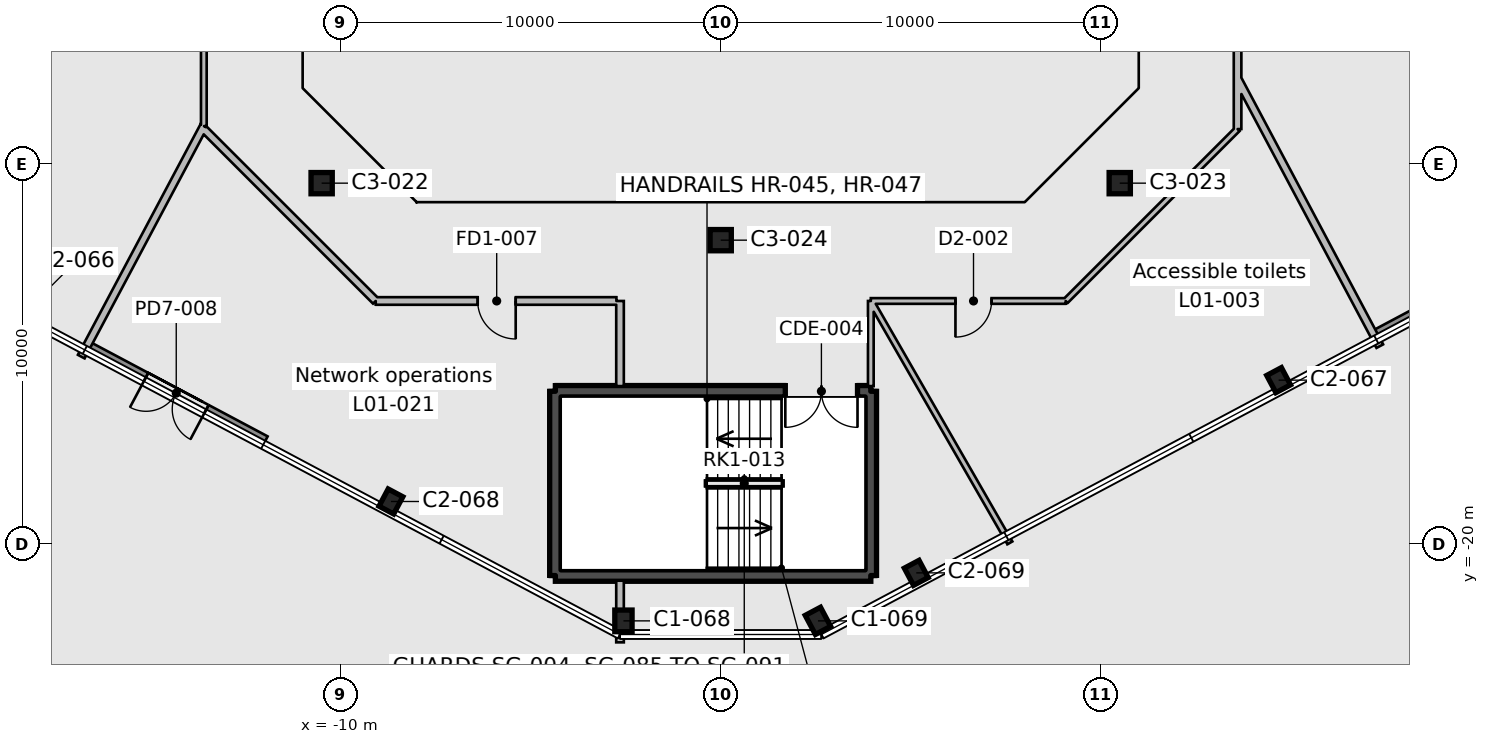
"""IFC4 building model, lengths in metres.
Left out: names, types, materials, properties, quantities, classifications, styles, units other than length and angle.
Written with IfcOpenShell. Run it as: python <this file> out.ifc"""

import sys

from ifc_helpers import new_model, si_unit, direction, frame, frame_2d, origin, origin_2d, place, context, subcontext, project, spatial, rectangle, hollow_rectangle, i_section, extrude, element, fill, save


model = new_model("IFC4")
c1 = context("Model", 3, precision=1e-05, world=origin(), true_north=direction((0.0, 1.0)))
c2 = subcontext(c1, "Body", "Model", "MODEL_VIEW")
j1 = project(units=[si_unit("LENGTHUNIT", "METRE"), si_unit("PLANEANGLEUNIT", "RADIAN")], contexts=[c1])
p1 = place(None, origin())
s1 = spatial("IfcSite", under=j1, at=p1, CompositionType="ELEMENT")
p2 = place(p1, origin())
s2 = spatial("IfcBuilding", under=s1, at=p2, CompositionType="ELEMENT")
p3 = place(p2, frame((0.0, 0.0, 7.0)))
s3 = spatial("IfcBuildingStorey", under=s2, at=p3, CompositionType="ELEMENT", Elevation=7.0)
for number, where, z_axis, x_axis in (
    (1, (-2.559, -22.017, 0.0), (0.0, 0.0, 1.0), (1.0, 0.0, 0.0)),
    (2, (2.559, -22.017, 0.0), (0.0, 0.0, 1.0), (0.883, 0.469, 0.0)),
):
    element("IfcColumn", number, at=place(p3, frame(where, z_axis=z_axis, x_axis=x_axis)), inside=s3, PredefinedType="COLUMN", context=c2, shape_type="SweptSolid", body=[
        extrude(i_section(OverallWidth=0.455, OverallDepth=0.569, WebThickness=0.078, FlangeThickness=0.125, FilletRadius=0.015, at=origin_2d()), origin(), (0.0, 0.0, 1.0), 5.2),
    ])
for number, where, z_axis, x_axis in (
    (3, (5.146, -20.754, 0.0), (0.0, 0.0, 1.0), (0.883, 0.469, 0.0)),
    (4, (-8.677, -18.876, 0.0), (0.0, 0.0, 1.0), (0.883, -0.469, 0.0)),
    (5, (14.681, -15.683, 0.0), (0.0, 0.0, 1.0), (0.883, 0.469, 0.0)),
):
    element("IfcColumn", number, at=place(p3, frame(where, z_axis=z_axis, x_axis=x_axis)), inside=s3, PredefinedType="COLUMN", context=c2, shape_type="SweptSolid", body=[
        extrude(i_section(OverallWidth=0.437, OverallDepth=0.513, WebThickness=0.061, FlangeThickness=0.097, FilletRadius=0.015, at=origin_2d()), origin(), (0.0, 0.0, 1.0), 5.2),
    ])
for number, where, z_axis, x_axis in (
    (6, (0.0, -12.0, 0.0), (0.0, 0.0, 1.0), (1.0, 0.0, 0.0)),
    (7, (-10.5, -10.5, 0.0), (0.0, 0.0, 1.0), (1.0, 0.0, 0.0)),
    (8, (10.5, -10.5, 0.0), (0.0, 0.0, 1.0), (1.0, 0.0, 0.0)),
):
    element("IfcColumn", number, at=place(p3, frame(where, z_axis=z_axis, x_axis=x_axis)), inside=s3, PredefinedType="COLUMN", context=c2, shape_type="SweptSolid", body=[
        extrude(hollow_rectangle(XDim=0.559, YDim=0.559, WallThickness=0.024, InnerFilletRadius=0.012, OuterFilletRadius=0.035, at=origin_2d()), origin(), (0.0, 0.0, 1.0), 5.2),
    ])
p4 = place(p3, frame((3.95, -15.975, 0.0), z_axis=(0.0, 0.0, 1.0), x_axis=(0.0, -1.0, 0.0)))
e9 = element("IfcWall", 9, at=p4, inside=s3, PredefinedType="SHEAR", context=c2, shape_type="SweptSolid", body=[
    extrude(rectangle(XDim=4.85, YDim=0.3, at=frame_2d((2.425, 0.0))), origin(), (0.0, 0.0, 1.0), 5.2),
])
p5 = place(p3, frame((3.95, -20.825, 0.0), z_axis=(0.0, 0.0, 1.0), x_axis=(-1.0, 0.0, 0.0)))
e10 = element("IfcWall", 10, at=p5, inside=s3, PredefinedType="SHEAR", context=c2, shape_type="SweptSolid", body=[
    extrude(rectangle(XDim=8.3, YDim=0.3, at=frame_2d((4.15, 0.0))), origin(), (0.0, 0.0, 1.0), 5.2),
])
p6 = place(p3, frame((-4.35, -20.825, 0.0), z_axis=(0.0, 0.0, 1.0), x_axis=(0.0, 1.0, 0.0)))
e11 = element("IfcWall", 11, at=p6, inside=s3, PredefinedType="SHEAR", context=c2, shape_type="SweptSolid", body=[
    extrude(rectangle(XDim=4.85, YDim=0.3, at=frame_2d((2.425, 0.0))), origin(), (0.0, 0.0, 1.0), 5.2),
])
p7 = place(p3, frame((-4.35, -15.975, 0.0), z_axis=(0.0, 0.0, 1.0), x_axis=(1.0, 0.0, 0.0)))
e12 = element("IfcWall", 12, at=p7, inside=s3, PredefinedType="SHEAR", context=c2, shape_type="SweptSolid", body=[
    extrude(rectangle(XDim=8.3, YDim=0.3, at=frame_2d((4.15, 0.0))), origin(), (0.0, 0.0, 1.0), 5.2),
])
p8 = place(p7, frame((6.05, 0.0, 0.0)))
e13 = element("IfcOpeningElement", 13, at=p8, cuts=e12, PredefinedType="OPENING", context=c2, shape_type="SweptSolid", body=[
    extrude(rectangle(XDim=1.9, YDim=2.1, at=frame_2d((0.95, 1.05))), frame((0.0, 0.16, 0.0), z_axis=(0.0, -1.0, 0.0), x_axis=(1.0, 0.0, 0.0)), (0.0, 0.0, 1.0), 0.32),
])
p9 = place(p3, frame((17.19, -14.502, 0.0), z_axis=(0.0, 0.0, 1.0), x_axis=(0.88294935199, 0.469468254326, 0.0)))
e14 = element("IfcWall", 14, at=p9, inside=s3, PredefinedType="STANDARD", context=c2, shape_type="SweptSolid", body=[
    extrude(rectangle(XDim=5.512, YDim=0.25, at=frame_2d((2.756, 0.0))), origin(), (0.0, 0.0, 1.0), 3.612),
])
p10 = place(p9, frame((1.856, 0.0, 0.0)))
e15 = element("IfcOpeningElement", 15, at=p10, cuts=e14, PredefinedType="OPENING", context=c2, shape_type="SweptSolid", body=[
    extrude(rectangle(XDim=1.8, YDim=2.4, at=frame_2d((0.9, 1.2))), frame((0.0, 0.135, 0.0), z_axis=(0.0, -1.0, 0.0), x_axis=(1.0, 0.0, 0.0)), (0.0, 0.0, 1.0), 0.27),
])
p11 = place(p3, frame((-16.673, -14.777, 0.0), z_axis=(0.0, 0.0, 1.0), x_axis=(0.882942052833, -0.46948198191, 0.0)))
e16 = element("IfcWall", 16, at=p11, inside=s3, PredefinedType="STANDARD", context=c2, shape_type="SweptSolid", body=[
    extrude(rectangle(XDim=5.317, YDim=0.25, at=frame_2d((2.658, 0.0))), origin(), (0.0, 0.0, 1.0), 3.612),
])
p12 = place(p11, frame((1.758, 0.0, 0.0)))
e17 = element("IfcOpeningElement", 17, at=p12, cuts=e16, PredefinedType="OPENING", context=c2, shape_type="SweptSolid", body=[
    extrude(rectangle(XDim=1.8, YDim=2.4, at=frame_2d((0.9, 1.2))), frame((0.0, 0.135, 0.0), z_axis=(0.0, -1.0, 0.0), x_axis=(1.0, 0.0, 0.0)), (0.0, 0.0, 1.0), 0.27),
])
p13 = place(p3, frame((-13.6, -8.998, 0.0), z_axis=(0.0, 0.0, 1.0), x_axis=(0.0, 1.0, 0.0)))
e18 = element("IfcWall", 18, at=p13, inside=s3, PredefinedType="PARTITIONING", context=c2, shape_type="SweptSolid", body=[
    extrude(rectangle(XDim=2.129, YDim=0.15, at=frame_2d((1.064, 0.0))), origin(), (0.0, 0.0, 1.0), 4.75),
])
p14 = place(p3, frame((-13.6, -8.998, 0.0), z_axis=(0.0, 0.0, 1.0), x_axis=(-0.469531053644, -0.882915958438, 0.0)))
e19 = element("IfcWall", 19, at=p14, inside=s3, PredefinedType="PARTITIONING", context=c2, shape_type="SweptSolid", body=[
    extrude(rectangle(XDim=6.87, YDim=0.2, at=frame_2d((3.435, 0.0))), origin(), (0.0, 0.0, 1.0), 4.75),
])
p15 = place(p3, frame((-2.744, -13.6, 0.0), z_axis=(0.0, 0.0, 1.0), x_axis=(-1.0, 0.0, 0.0)))
e20 = element("IfcWall", 20, at=p15, inside=s3, PredefinedType="PARTITIONING", context=c2, shape_type="SweptSolid", body=[
    extrude(rectangle(XDim=6.333, YDim=0.2, at=frame_2d((3.167, 0.0))), origin(), (0.0, 0.0, 1.0), 4.75),
])
p16 = place(p15, frame((2.65, 0.0, 0.0)))
e21 = element("IfcOpeningElement", 21, at=p16, cuts=e20, PredefinedType="OPENING", context=c2, shape_type="SweptSolid", body=[
    extrude(rectangle(XDim=1.0, YDim=2.1, at=frame_2d((0.5, 1.05))), frame((0.0, 0.11, 0.0), z_axis=(0.0, -1.0, 0.0), x_axis=(1.0, 0.0, 0.0)), (0.0, 0.0, 1.0), 0.22),
])
p17 = place(p3, frame((-9.077, -13.6, 0.0), z_axis=(0.0, 0.0, 1.0), x_axis=(-0.707106781187, 0.707106781187, 0.0)))
e22 = element("IfcWall", 22, at=p17, inside=s3, PredefinedType="PARTITIONING", context=c2, shape_type="SweptSolid", body=[
    extrude(rectangle(XDim=6.397, YDim=0.2, at=frame_2d((3.198, 0.0))), origin(), (0.0, 0.0, 1.0), 4.75),
])
p18 = place(p3, frame((-2.649, -15.84, 0.0), z_axis=(0.0, 0.0, 1.0), x_axis=(0.0, 1.0, 0.0)))
e23 = element("IfcWall", 23, at=p18, inside=s3, PredefinedType="PARTITIONING", context=c2, shape_type="SweptSolid", body=[
    extrude(rectangle(XDim=2.24, YDim=0.2, at=frame_2d((1.12, 0.0))), origin(), (0.0, 0.0, 1.0), 4.75),
])
p19 = place(p3, frame((-2.649, -20.96, 0.0), z_axis=(0.0, 0.0, 1.0), x_axis=(0.0, -1.0, 0.0)))
e24 = element("IfcWall", 24, at=p19, inside=s3, PredefinedType="PARTITIONING", context=c2, shape_type="SweptSolid", body=[
    extrude(rectangle(XDim=1.622, YDim=0.2, at=frame_2d((0.811, 0.0))), origin(), (0.0, 0.0, 1.0), 4.75),
])
p20 = place(p3, frame((3.95, -13.6, 0.0), z_axis=(0.0, 0.0, 1.0), x_axis=(0.0, -1.0, 0.0)))
e25 = element("IfcWall", 25, at=p20, inside=s3, PredefinedType="PARTITIONING", context=c2, shape_type="SweptSolid", body=[
    extrude(rectangle(XDim=2.24, YDim=0.15, at=frame_2d((1.12, 0.0))), origin(), (0.0, 0.0, 1.0), 4.75),
])
p21 = place(p3, frame((13.6, -7.756, 0.0), z_axis=(0.0, 0.0, 1.0), x_axis=(0.0, -1.0, 0.0)))
e26 = element("IfcWall", 26, at=p21, inside=s3, PredefinedType="PARTITIONING", context=c2, shape_type="SweptSolid", body=[
    extrude(rectangle(XDim=1.321, YDim=0.2, at=frame_2d((0.66, 0.0))), origin(), (0.0, 0.0, 1.0), 4.75),
])
p22 = place(p3, frame((13.6, -9.077, 0.0), z_axis=(0.0, 0.0, 1.0), x_axis=(-0.707106781187, -0.707106781187, 0.0)))
e27 = element("IfcWall", 27, at=p22, inside=s3, PredefinedType="PARTITIONING", context=c2, shape_type="SweptSolid", body=[
    extrude(rectangle(XDim=6.397, YDim=0.15, at=frame_2d((3.198, 0.0))), origin(), (0.0, 0.0, 1.0), 4.75),
])
p23 = place(p3, frame((9.077, -13.6, 0.0), z_axis=(0.0, 0.0, 1.0), x_axis=(-1.0, 0.0, 0.0)))
e28 = element("IfcWall", 28, at=p23, inside=s3, PredefinedType="PARTITIONING", context=c2, shape_type="SweptSolid", body=[
    extrude(rectangle(XDim=5.127, YDim=0.15, at=frame_2d((2.563, 0.0))), origin(), (0.0, 0.0, 1.0), 4.75),
])
p24 = place(p23, frame((1.95, 0.0, 0.0)))
e29 = element("IfcOpeningElement", 29, at=p24, cuts=e28, PredefinedType="OPENING", context=c2, shape_type="SweptSolid", body=[
    extrude(rectangle(XDim=0.95, YDim=2.1, at=frame_2d((0.475, 1.05))), frame((0.0, 0.085, 0.0), z_axis=(0.0, -1.0, 0.0), x_axis=(1.0, 0.0, 0.0)), (0.0, 0.0, 1.0), 0.17),
])
p25 = place(p3, frame((7.609, -19.965, 0.0), z_axis=(0.0, 0.0, 1.0), x_axis=(-0.498375530061, 0.866961262708, 0.0)))
e30 = element("IfcWall", 30, at=p25, inside=s3, PredefinedType="PARTITIONING", context=c2, shape_type="SweptSolid", body=[
    extrude(rectangle(XDim=7.342, YDim=0.15, at=frame_2d((3.671, 0.0))), origin(), (0.0, 0.0, 1.0), 4.75),
])
p26 = place(p3, frame((13.6, -7.75, 0.0), z_axis=(0.0, 0.0, 1.0), x_axis=(0.469489555723, -0.882938025609, 0.0)))
e31 = element("IfcWall", 31, at=p26, inside=s3, PredefinedType="PARTITIONING", context=c2, shape_type="SweptSolid", body=[
    extrude(rectangle(XDim=7.972, YDim=0.2, at=frame_2d((3.986, 0.0))), origin(), (0.0, 0.0, 1.0), 4.75),
])
p27 = place(p3, frame((13.6, -6.869, 0.0), z_axis=(0.0, 0.0, 1.0), x_axis=(0.0, -1.0, 0.0)))
e32 = element("IfcWall", 32, at=p27, inside=s3, PredefinedType="PARTITIONING", context=c2, shape_type="SweptSolid", body=[
    extrude(rectangle(XDim=0.887, YDim=0.2, at=frame_2d((0.444, 0.0))), origin(), (0.0, 0.0, 1.0), 4.75),
])
p28 = place(p8, frame((1.9, 0.0, 0.0), z_axis=(0.0, 0.0, 1.0), x_axis=(-1.0, 0.0, 0.0)))
e33 = element("IfcDoor", 33, at=p28, inside=s3, OperationType="DOUBLE_DOOR_SINGLE_SWING", PredefinedType="DOOR", context=c2, shape_type="SweptSolid", body=[
    extrude(rectangle(XDim=1.9, YDim=2.1, at=frame_2d((0.95, 1.05))), frame((0.0, 0.025, 0.0), z_axis=(0.0, -1.0, 0.0), x_axis=(1.0, 0.0, 0.0)), (0.0, 0.0, 1.0), 0.05),
])
fill(e13, e33)
p29 = place(p12, frame((1.8, 0.0, 0.0), z_axis=(0.0, 0.0, 1.0), x_axis=(-1.0, 0.0, 0.0)))
e34 = element("IfcDoor", 34, at=p29, inside=s3, OperationType="DOUBLE_DOOR_SINGLE_SWING", PredefinedType="DOOR", context=c2, shape_type="SweptSolid", body=[
    extrude(rectangle(XDim=1.8, YDim=2.4, at=frame_2d((0.9, 1.2))), frame((0.0, 0.025, 0.0), z_axis=(0.0, -1.0, 0.0), x_axis=(1.0, 0.0, 0.0)), (0.0, 0.0, 1.0), 0.05),
])
fill(e17, e34)
p30 = place(p24, origin())
e35 = element("IfcDoor", 35, at=p30, inside=s3, OperationType="SINGLE_SWING_RIGHT", PredefinedType="DOOR", context=c2, shape_type="SweptSolid", body=[
    extrude(rectangle(XDim=0.95, YDim=2.1, at=frame_2d((0.475, 1.05))), frame((0.0, 0.025, 0.0), z_axis=(0.0, -1.0, 0.0), x_axis=(1.0, 0.0, 0.0)), (0.0, 0.0, 1.0), 0.05),
])
fill(e29, e35)
p31 = place(p16, origin())
e36 = element("IfcDoor", 36, at=p31, inside=s3, OperationType="SINGLE_SWING_LEFT", PredefinedType="DOOR", context=c2, shape_type="SweptSolid", body=[
    extrude(rectangle(XDim=1.0, YDim=2.1, at=frame_2d((0.5, 1.05))), frame((0.0, 0.025, 0.0), z_axis=(0.0, -1.0, 0.0), x_axis=(1.0, 0.0, 0.0)), (0.0, 0.0, 1.0), 0.05),
])
fill(e21, e36)
save(model, sys.argv[1])
